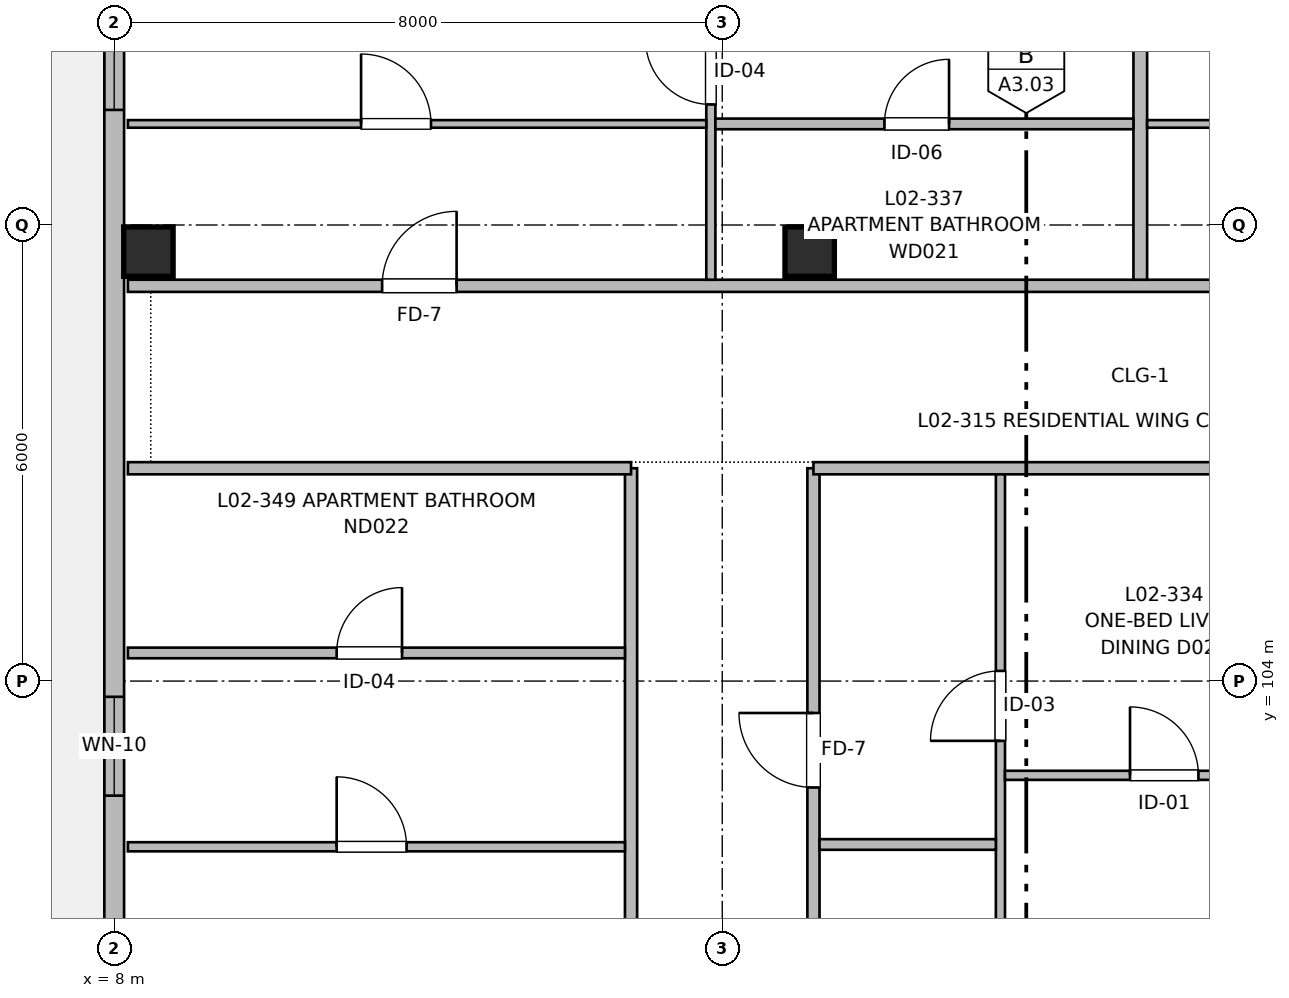
"""IFC4 building model, lengths in metres.
Left out: names, types, materials, properties, quantities, classifications, styles, units other than length and angle.
Written with IfcOpenShell. Run it as: python <this file> out.ifc"""

import sys

from ifc_helpers import new_model, si_unit, direction, frame, frame_2d, origin, origin_2d, place, context, subcontext, project, spatial, rectangle, extrude, element, fill, save


model = new_model("IFC4")
c1 = context("Model", 3, precision=1e-05, world=origin(), true_north=direction((0.0, 1.0)))
c2 = subcontext(c1, "Body", "Model", "MODEL_VIEW")
j1 = project(units=[si_unit("LENGTHUNIT", "METRE"), si_unit("PLANEANGLEUNIT", "RADIAN")], contexts=[c1])
p1 = place(None, origin())
s1 = spatial("IfcSite", under=j1, at=p1, CompositionType="ELEMENT")
p2 = place(p1, origin())
s2 = spatial("IfcBuilding", under=s1, at=p2, CompositionType="ELEMENT")
p3 = place(p2, frame((0.0, 0.0, 7.36)))
s3 = spatial("IfcBuildingStorey", under=s2, at=p3, CompositionType="ELEMENT", Elevation=7.36)
for number, where, z_axis, x_axis in (
    (1, (8.45, 109.65, 0.0), (0.0, 0.0, 1.0), (1.0, 0.0, 0.0)),
    (2, (17.15, 109.65, 0.0), (0.0, 0.0, 1.0), (1.0, 0.0, 0.0)),
):
    element("IfcColumn", number, at=place(p3, frame(where, z_axis=z_axis, x_axis=x_axis)), inside=s3, PredefinedType="COLUMN", context=c2, shape_type="SweptSolid", body=[
        extrude(rectangle(XDim=0.65, YDim=0.65, at=origin_2d()), origin(), (0.0, 0.0, 1.0), 3.2),
    ])
p4 = place(p3, frame((8.0, 56.0, 0.0), z_axis=(0.0, 0.0, 1.0), x_axis=(0.0, 1.0, 0.0)))
e3 = element("IfcWall", 3, at=p4, inside=s3, PredefinedType="SOLIDWALL", context=c2, shape_type="SweptSolid", body=[
    extrude(rectangle(XDim=60.0, YDim=0.26, at=frame_2d((30.0, 0.0))), origin(), (0.0, 0.0, 1.0), 2.98),
])
p5 = place(p4, frame((4.886, 0.0, 0.0)))
e4 = element("IfcOpeningElement", 4, at=p5, cuts=e3, PredefinedType="OPENING", context=c2, shape_type="SweptSolid", body=[
    extrude(rectangle(XDim=1.2, YDim=2.2, at=frame_2d((0.6, 1.1))), frame((0.0, 0.14, 0.0), z_axis=(0.0, -1.0, 0.0), x_axis=(1.0, 0.0, 0.0)), (0.0, 0.0, 1.0), 0.28),
])
p6 = place(p4, frame((12.107, 0.0, 0.82)))
e5 = element("IfcOpeningElement", 5, at=p6, cuts=e3, PredefinedType="OPENING", context=c2, shape_type="SweptSolid", body=[
    extrude(rectangle(XDim=1.5, YDim=1.4, at=frame_2d((0.75, 0.7))), frame((0.0, 0.14, 0.0), z_axis=(0.0, -1.0, 0.0), x_axis=(1.0, 0.0, 0.0)), (0.0, 0.0, 1.0), 0.28),
])
p7 = place(p4, frame((19.804, 0.0, 0.82)))
e6 = element("IfcOpeningElement", 6, at=p7, cuts=e3, PredefinedType="OPENING", context=c2, shape_type="SweptSolid", body=[
    extrude(rectangle(XDim=1.55, YDim=1.4, at=frame_2d((0.775, 0.7))), frame((0.0, 0.14, 0.0), z_axis=(0.0, -1.0, 0.0), x_axis=(1.0, 0.0, 0.0)), (0.0, 0.0, 1.0), 0.28),
])
p8 = place(p4, frame((29.3, 0.0, 0.87)))
e7 = element("IfcOpeningElement", 7, at=p8, cuts=e3, PredefinedType="OPENING", context=c2, shape_type="SweptSolid", body=[
    extrude(rectangle(XDim=1.4, YDim=1.35, at=frame_2d((0.7, 0.675))), frame((0.0, 0.14, 0.0), z_axis=(0.0, -1.0, 0.0), x_axis=(1.0, 0.0, 0.0)), (0.0, 0.0, 1.0), 0.28),
])
p9 = place(p4, frame((40.946, 0.0, 0.87)))
e8 = element("IfcOpeningElement", 8, at=p9, cuts=e3, PredefinedType="OPENING", context=c2, shape_type="SweptSolid", body=[
    extrude(rectangle(XDim=1.25, YDim=1.35, at=frame_2d((0.625, 0.675))), frame((0.0, 0.14, 0.0), z_axis=(0.0, -1.0, 0.0), x_axis=(1.0, 0.0, 0.0)), (0.0, 0.0, 1.0), 0.28),
])
p10 = place(p4, frame((46.493, 0.0, 0.82)))
e9 = element("IfcOpeningElement", 9, at=p10, cuts=e3, PredefinedType="OPENING", context=c2, shape_type="SweptSolid", body=[
    extrude(rectangle(XDim=1.3, YDim=1.4, at=frame_2d((0.65, 0.7))), frame((0.0, 0.14, 0.0), z_axis=(0.0, -1.0, 0.0), x_axis=(1.0, 0.0, 0.0)), (0.0, 0.0, 1.0), 0.28),
])
p11 = place(p4, frame((55.514, 0.0, 0.67)))
e10 = element("IfcOpeningElement", 10, at=p11, cuts=e3, PredefinedType="OPENING", context=c2, shape_type="SweptSolid", body=[
    extrude(rectangle(XDim=2.1, YDim=1.55, at=frame_2d((1.05, 0.775))), frame((0.0, 0.14, 0.0), z_axis=(0.0, -1.0, 0.0), x_axis=(1.0, 0.0, 0.0)), (0.0, 0.0, 1.0), 0.28),
])
p12 = place(p3, frame((14.8, 56.18, 0.0), z_axis=(0.0, 0.0, 1.0), x_axis=(0.0, 1.0, 0.0)))
e11 = element("IfcWall", 11, at=p12, inside=s3, PredefinedType="PARTITIONING", context=c2, shape_type="SweptSolid", body=[
    extrude(rectangle(XDim=50.62, YDim=0.16, at=frame_2d((25.31, 0.0))), origin(), (0.0, 0.0, 1.0), 2.935),
])
p13 = place(p12, frame((12.82, 0.0, 0.0)))
e12 = element("IfcOpeningElement", 12, at=p13, cuts=e11, PredefinedType="OPENING", context=c2, shape_type="SweptSolid", body=[
    extrude(rectangle(XDim=1.1, YDim=2.15, at=frame_2d((0.55, 1.075))), frame((0.0, 0.09, 0.0), z_axis=(0.0, -1.0, 0.0), x_axis=(1.0, 0.0, 0.0)), (0.0, 0.0, 1.0), 0.18),
])
p14 = place(p12, frame((19.22, 0.0, 0.0)))
e13 = element("IfcOpeningElement", 13, at=p14, cuts=e11, PredefinedType="OPENING", context=c2, shape_type="SweptSolid", body=[
    extrude(rectangle(XDim=1.6, YDim=2.15, at=frame_2d((0.8, 1.075))), frame((0.0, 0.09, 0.0), z_axis=(0.0, -1.0, 0.0), x_axis=(1.0, 0.0, 0.0)), (0.0, 0.0, 1.0), 0.18),
])
p15 = place(p12, frame((1.8, 0.0, 0.0)))
e14 = element("IfcOpeningElement", 14, at=p15, cuts=e11, PredefinedType="OPENING", context=c2, shape_type="SweptSolid", body=[
    extrude(rectangle(XDim=0.96, YDim=2.15, at=frame_2d((0.48, 1.075))), frame((0.0, 0.09, 0.0), z_axis=(0.0, -1.0, 0.0), x_axis=(1.0, 0.0, 0.0)), (0.0, 0.0, 1.0), 0.18),
])
p16 = place(p12, frame((32.625, 0.0, 0.0)))
e15 = element("IfcOpeningElement", 15, at=p16, cuts=e11, PredefinedType="OPENING", context=c2, shape_type="SweptSolid", body=[
    extrude(rectangle(XDim=0.98, YDim=2.15, at=frame_2d((0.49, 1.075))), frame((0.0, 0.09, 0.0), z_axis=(0.0, -1.0, 0.0), x_axis=(1.0, 0.0, 0.0)), (0.0, 0.0, 1.0), 0.18),
])
p17 = place(p12, frame((41.235, 0.0, 0.0)))
e16 = element("IfcOpeningElement", 16, at=p17, cuts=e11, PredefinedType="OPENING", context=c2, shape_type="SweptSolid", body=[
    extrude(rectangle(XDim=0.98, YDim=2.15, at=frame_2d((0.49, 1.075))), frame((0.0, 0.09, 0.0), z_axis=(0.0, -1.0, 0.0), x_axis=(1.0, 0.0, 0.0)), (0.0, 0.0, 1.0), 0.18),
])
p18 = place(p3, frame((17.2, 56.18, 0.0), z_axis=(0.0, 0.0, 1.0), x_axis=(0.0, 1.0, 0.0)))
e17 = element("IfcWall", 17, at=p18, inside=s3, PredefinedType="PARTITIONING", context=c2, shape_type="SweptSolid", body=[
    extrude(rectangle(XDim=50.62, YDim=0.16, at=frame_2d((25.31, 0.0))), origin(), (0.0, 0.0, 1.0), 2.935),
])
p19 = place(p18, frame((7.68, 0.0, 0.0)))
e18 = element("IfcOpeningElement", 18, at=p19, cuts=e17, PredefinedType="OPENING", context=c2, shape_type="SweptSolid", body=[
    extrude(rectangle(XDim=0.98, YDim=2.15, at=frame_2d((0.49, 1.075))), frame((0.0, 0.09, 0.0), z_axis=(0.0, -1.0, 0.0), x_axis=(1.0, 0.0, 0.0)), (0.0, 0.0, 1.0), 0.18),
])
p20 = place(p18, frame((22.43, 0.0, 0.0)))
e19 = element("IfcOpeningElement", 19, at=p20, cuts=e17, PredefinedType="OPENING", context=c2, shape_type="SweptSolid", body=[
    extrude(rectangle(XDim=0.98, YDim=2.15, at=frame_2d((0.49, 1.075))), frame((0.0, 0.09, 0.0), z_axis=(0.0, -1.0, 0.0), x_axis=(1.0, 0.0, 0.0)), (0.0, 0.0, 1.0), 0.18),
])
p21 = place(p18, frame((35.65, 0.0, 0.0)))
e20 = element("IfcOpeningElement", 20, at=p21, cuts=e17, PredefinedType="OPENING", context=c2, shape_type="SweptSolid", body=[
    extrude(rectangle(XDim=0.98, YDim=2.15, at=frame_2d((0.49, 1.075))), frame((0.0, 0.09, 0.0), z_axis=(0.0, -1.0, 0.0), x_axis=(1.0, 0.0, 0.0)), (0.0, 0.0, 1.0), 0.18),
])
p22 = place(p18, frame((46.42, 0.0, 0.0)))
e21 = element("IfcOpeningElement", 21, at=p22, cuts=e17, PredefinedType="OPENING", context=c2, shape_type="SweptSolid", body=[
    extrude(rectangle(XDim=0.98, YDim=2.15, at=frame_2d((0.49, 1.075))), frame((0.0, 0.09, 0.0), z_axis=(0.0, -1.0, 0.0), x_axis=(1.0, 0.0, 0.0)), (0.0, 0.0, 1.0), 0.18),
])
p23 = place(p3, frame((8.18, 106.8, 0.0), z_axis=(0.0, 0.0, 1.0), x_axis=(1.0, 0.0, 0.0)))
e22 = element("IfcWall", 22, at=p23, inside=s3, PredefinedType="PARTITIONING", context=c2, shape_type="SweptSolid", body=[
    extrude(rectangle(XDim=6.62, YDim=0.16, at=frame_2d((3.31, 0.0))), origin(), (0.0, 0.0, 1.0), 2.935),
])
p24 = place(p3, frame((17.2, 106.8, 0.0), z_axis=(0.0, 0.0, 1.0), x_axis=(1.0, 0.0, 0.0)))
e23 = element("IfcWall", 23, at=p24, inside=s3, PredefinedType="PARTITIONING", context=c2, shape_type="SweptSolid", body=[
    extrude(rectangle(XDim=17.62, YDim=0.16, at=frame_2d((8.81, 0.0))), origin(), (0.0, 0.0, 1.0), 2.935),
])
p25 = place(p24, frame((13.075, 0.0, 0.0)))
e24 = element("IfcOpeningElement", 24, at=p25, cuts=e23, PredefinedType="OPENING", context=c2, shape_type="SweptSolid", body=[
    extrude(rectangle(XDim=1.05, YDim=2.15, at=frame_2d((0.525, 1.075))), frame((0.0, 0.09, 0.0), z_axis=(0.0, -1.0, 0.0), x_axis=(1.0, 0.0, 0.0)), (0.0, 0.0, 1.0), 0.18),
])
p26 = place(p3, frame((8.18, 109.2, 0.0), z_axis=(0.0, 0.0, 1.0), x_axis=(1.0, 0.0, 0.0)))
e25 = element("IfcWall", 25, at=p26, inside=s3, PredefinedType="PARTITIONING", context=c2, shape_type="SweptSolid", body=[
    extrude(rectangle(XDim=26.64, YDim=0.16, at=frame_2d((13.32, 0.0))), origin(), (0.0, 0.0, 1.0), 2.935),
])
p27 = place(p26, frame((3.345, 0.0, 0.0)))
e26 = element("IfcOpeningElement", 26, at=p27, cuts=e25, PredefinedType="OPENING", context=c2, shape_type="SweptSolid", body=[
    extrude(rectangle(XDim=0.98, YDim=2.15, at=frame_2d((0.49, 1.075))), frame((0.0, 0.09, 0.0), z_axis=(0.0, -1.0, 0.0), x_axis=(1.0, 0.0, 0.0)), (0.0, 0.0, 1.0), 0.18),
])
p28 = place(p26, frame((15.955, 0.0, 0.0)))
e27 = element("IfcOpeningElement", 27, at=p28, cuts=e25, PredefinedType="OPENING", context=c2, shape_type="SweptSolid", body=[
    extrude(rectangle(XDim=0.98, YDim=2.15, at=frame_2d((0.49, 1.075))), frame((0.0, 0.09, 0.0), z_axis=(0.0, -1.0, 0.0), x_axis=(1.0, 0.0, 0.0)), (0.0, 0.0, 1.0), 0.18),
])
p29 = place(p3, frame((19.66, 97.71, 0.0), z_axis=(0.0, 0.0, 1.0), x_axis=(0.0, 1.0, 0.0)))
e28 = element("IfcWall", 28, at=p29, inside=s3, PredefinedType="PARTITIONING", context=c2, shape_type="SweptSolid", body=[
    extrude(rectangle(XDim=9.01, YDim=0.12, at=frame_2d((4.505, 0.0))), origin(), (0.0, 0.0, 1.0), 2.935),
])
p30 = place(p29, frame((1.573, 0.0, 0.0)))
e29 = element("IfcOpeningElement", 29, at=p30, cuts=e28, PredefinedType="OPENING", context=c2, shape_type="SweptSolid", body=[
    extrude(rectangle(XDim=0.86, YDim=2.1, at=frame_2d((0.43, 1.05))), frame((0.0, 0.07, 0.0), z_axis=(0.0, -1.0, 0.0), x_axis=(1.0, 0.0, 0.0)), (0.0, 0.0, 1.0), 0.14),
])
p31 = place(p29, frame((5.504, 0.0, 0.0)))
e30 = element("IfcOpeningElement", 30, at=p31, cuts=e28, PredefinedType="OPENING", context=c2, shape_type="SweptSolid", body=[
    extrude(rectangle(XDim=0.92, YDim=2.1, at=frame_2d((0.46, 1.05))), frame((0.0, 0.07, 0.0), z_axis=(0.0, -1.0, 0.0), x_axis=(1.0, 0.0, 0.0)), (0.0, 0.0, 1.0), 0.14),
])
p32 = place(p3, frame((17.28, 101.85, 0.0), z_axis=(0.0, 0.0, 1.0), x_axis=(1.0, 0.0, 0.0)))
e31 = element("IfcWall", 31, at=p32, inside=s3, PredefinedType="PARTITIONING", context=c2, shape_type="SweptSolid", body=[
    extrude(rectangle(XDim=2.32, YDim=0.14, at=frame_2d((1.16, 0.0))), origin(), (0.0, 0.0, 1.0), 2.935),
])
p33 = place(p3, frame((19.72, 102.76, 0.0), z_axis=(0.0, 0.0, 1.0), x_axis=(1.0, 0.0, 0.0)))
e32 = element("IfcWall", 32, at=p33, inside=s3, PredefinedType="PARTITIONING", context=c2, shape_type="SweptSolid", body=[
    extrude(rectangle(XDim=4.19, YDim=0.12, at=frame_2d((2.095, 0.0))), origin(), (0.0, 0.0, 1.0), 2.935),
])
p34 = place(p33, frame((1.645, 0.0, 0.0)))
e33 = element("IfcOpeningElement", 33, at=p34, cuts=e32, PredefinedType="OPENING", context=c2, shape_type="SweptSolid", body=[
    extrude(rectangle(XDim=0.9, YDim=2.1, at=frame_2d((0.45, 1.05))), frame((0.0, 0.07, 0.0), z_axis=(0.0, -1.0, 0.0), x_axis=(1.0, 0.0, 0.0)), (0.0, 0.0, 1.0), 0.14),
])
p35 = place(p3, frame((21.5, 109.28, 0.0), z_axis=(0.0, 0.0, 1.0), x_axis=(0.0, 1.0, 0.0)))
e34 = element("IfcWall", 34, at=p35, inside=s3, PredefinedType="PARTITIONING", context=c2, shape_type="SweptSolid", body=[
    extrude(rectangle(XDim=6.59, YDim=0.18, at=frame_2d((3.295, 0.0))), origin(), (0.0, 0.0, 1.0), 2.67),
])
p36 = place(p3, frame((15.85, 109.28, 0.0), z_axis=(0.0, 0.0, 1.0), x_axis=(0.0, 1.0, 0.0)))
e35 = element("IfcWall", 35, at=p36, inside=s3, PredefinedType="PARTITIONING", context=c2, shape_type="SweptSolid", body=[
    extrude(rectangle(XDim=6.59, YDim=0.12, at=frame_2d((3.295, 0.0))), origin(), (0.0, 0.0, 1.0), 2.935),
])
p37 = place(p36, frame((2.306, 0.0, 0.0)))
e36 = element("IfcOpeningElement", 36, at=p37, cuts=e35, PredefinedType="OPENING", context=c2, shape_type="SweptSolid", body=[
    extrude(rectangle(XDim=0.86, YDim=2.1, at=frame_2d((0.43, 1.05))), frame((0.0, 0.07, 0.0), z_axis=(0.0, -1.0, 0.0), x_axis=(1.0, 0.0, 0.0)), (0.0, 0.0, 1.0), 0.14),
])
p38 = place(p36, frame((4.093, 0.0, 0.0)))
e37 = element("IfcOpeningElement", 37, at=p38, cuts=e35, PredefinedType="OPENING", context=c2, shape_type="SweptSolid", body=[
    extrude(rectangle(XDim=0.9, YDim=2.1, at=frame_2d((0.45, 1.05))), frame((0.0, 0.07, 0.0), z_axis=(0.0, -1.0, 0.0), x_axis=(1.0, 0.0, 0.0)), (0.0, 0.0, 1.0), 0.14),
])
p39 = place(p3, frame((15.91, 111.33, 0.0), z_axis=(0.0, 0.0, 1.0), x_axis=(1.0, 0.0, 0.0)))
e38 = element("IfcWall", 38, at=p39, inside=s3, PredefinedType="PARTITIONING", context=c2, shape_type="SweptSolid", body=[
    extrude(rectangle(XDim=5.5, YDim=0.14, at=frame_2d((2.75, 0.0))), origin(), (0.0, 0.0, 1.0), 2.935),
])
p40 = place(p39, frame((2.224, 0.0, 0.0)))
e39 = element("IfcOpeningElement", 39, at=p40, cuts=e38, PredefinedType="OPENING", context=c2, shape_type="SweptSolid", body=[
    extrude(rectangle(XDim=0.85, YDim=2.05, at=frame_2d((0.425, 1.025))), frame((0.0, 0.08, 0.0), z_axis=(0.0, -1.0, 0.0), x_axis=(1.0, 0.0, 0.0)), (0.0, 0.0, 1.0), 0.16),
])
p41 = place(p3, frame((8.18, 111.33, 0.0), z_axis=(0.0, 0.0, 1.0), x_axis=(1.0, 0.0, 0.0)))
e40 = element("IfcWall", 40, at=p41, inside=s3, PredefinedType="PARTITIONING", context=c2, shape_type="SweptSolid", body=[
    extrude(rectangle(XDim=7.61, YDim=0.1, at=frame_2d((3.805, 0.0))), origin(), (0.0, 0.0, 1.0), 2.935),
])
p42 = place(p41, frame((3.068, 0.0, 0.0)))
e41 = element("IfcOpeningElement", 41, at=p42, cuts=e40, PredefinedType="OPENING", context=c2, shape_type="SweptSolid", body=[
    extrude(rectangle(XDim=0.92, YDim=2.1, at=frame_2d((0.46, 1.05))), frame((0.0, 0.06, 0.0), z_axis=(0.0, -1.0, 0.0), x_axis=(1.0, 0.0, 0.0)), (0.0, 0.0, 1.0), 0.12),
])
p43 = place(p3, frame((21.59, 111.33, 0.0), z_axis=(0.0, 0.0, 1.0), x_axis=(1.0, 0.0, 0.0)))
e42 = element("IfcWall", 42, at=p43, inside=s3, PredefinedType="PARTITIONING", context=c2, shape_type="SweptSolid", body=[
    extrude(rectangle(XDim=7.61, YDim=0.1, at=frame_2d((3.805, 0.0))), origin(), (0.0, 0.0, 1.0), 2.935),
])
p44 = place(p43, frame((3.068, 0.0, 0.0)))
e43 = element("IfcOpeningElement", 43, at=p44, cuts=e42, PredefinedType="OPENING", context=c2, shape_type="SweptSolid", body=[
    extrude(rectangle(XDim=0.92, YDim=2.1, at=frame_2d((0.46, 1.05))), frame((0.0, 0.06, 0.0), z_axis=(0.0, -1.0, 0.0), x_axis=(1.0, 0.0, 0.0)), (0.0, 0.0, 1.0), 0.12),
])
p45 = place(p3, frame((8.18, 101.82, 0.0), z_axis=(0.0, 0.0, 1.0), x_axis=(1.0, 0.0, 0.0)))
e44 = element("IfcWall", 44, at=p45, inside=s3, PredefinedType="PARTITIONING", context=c2, shape_type="SweptSolid", body=[
    extrude(rectangle(XDim=6.54, YDim=0.12, at=frame_2d((3.27, 0.0))), origin(), (0.0, 0.0, 1.0), 2.935),
])
p46 = place(p45, frame((2.747, 0.0, 0.0)))
e45 = element("IfcOpeningElement", 45, at=p46, cuts=e44, PredefinedType="OPENING", context=c2, shape_type="SweptSolid", body=[
    extrude(rectangle(XDim=0.92, YDim=2.1, at=frame_2d((0.46, 1.05))), frame((0.0, 0.07, 0.0), z_axis=(0.0, -1.0, 0.0), x_axis=(1.0, 0.0, 0.0)), (0.0, 0.0, 1.0), 0.14),
])
p47 = place(p3, frame((8.18, 104.37, 0.0), z_axis=(0.0, 0.0, 1.0), x_axis=(1.0, 0.0, 0.0)))
e46 = element("IfcWall", 46, at=p47, inside=s3, PredefinedType="PARTITIONING", context=c2, shape_type="SweptSolid", body=[
    extrude(rectangle(XDim=6.54, YDim=0.14, at=frame_2d((3.27, 0.0))), origin(), (0.0, 0.0, 1.0), 2.935),
])
p48 = place(p47, frame((2.747, 0.0, 0.0)))
e47 = element("IfcOpeningElement", 47, at=p48, cuts=e46, PredefinedType="OPENING", context=c2, shape_type="SweptSolid", body=[
    extrude(rectangle(XDim=0.86, YDim=2.1, at=frame_2d((0.43, 1.05))), frame((0.0, 0.08, 0.0), z_axis=(0.0, -1.0, 0.0), x_axis=(1.0, 0.0, 0.0)), (0.0, 0.0, 1.0), 0.16),
])
p49 = place(p10, origin())
e48 = element("IfcWindow", 48, at=p49, inside=s3, PartitioningType="SINGLE_PANEL", PredefinedType="WINDOW", context=c2, shape_type="SweptSolid", body=[
    extrude(rectangle(XDim=1.3, YDim=1.4, at=frame_2d((0.65, 0.7))), frame((0.0, 0.03, 0.0), z_axis=(0.0, -1.0, 0.0), x_axis=(1.0, 0.0, 0.0)), (0.0, 0.0, 1.0), 0.06),
])
fill(e9, e48)
p50 = place(p11, origin())
e49 = element("IfcWindow", 49, at=p50, inside=s3, PartitioningType="SINGLE_PANEL", PredefinedType="WINDOW", context=c2, shape_type="SweptSolid", body=[
    extrude(rectangle(XDim=2.1, YDim=1.55, at=frame_2d((1.05, 0.775))), frame((0.0, 0.03, 0.0), z_axis=(0.0, -1.0, 0.0), x_axis=(1.0, 0.0, 0.0)), (0.0, 0.0, 1.0), 0.06),
])
fill(e10, e49)
p51 = place(p31, origin())
e50 = element("IfcDoor", 50, at=p51, inside=s3, OperationType="SINGLE_SWING_LEFT", PredefinedType="DOOR", context=c2, shape_type="SweptSolid", body=[
    extrude(rectangle(XDim=0.92, YDim=2.1, at=frame_2d((0.46, 1.05))), frame((0.0, 0.025, 0.0), z_axis=(0.0, -1.0, 0.0), x_axis=(1.0, 0.0, 0.0)), (0.0, 0.0, 1.0), 0.05),
])
fill(e30, e50)
p52 = place(p22, origin())
e51 = element("IfcDoor", 51, at=p52, inside=s3, OperationType="SINGLE_SWING_RIGHT", PredefinedType="DOOR", context=c2, shape_type="SweptSolid", body=[
    extrude(rectangle(XDim=0.98, YDim=2.15, at=frame_2d((0.49, 1.075))), frame((0.0, 0.025, 0.0), z_axis=(0.0, -1.0, 0.0), x_axis=(1.0, 0.0, 0.0)), (0.0, 0.0, 1.0), 0.05),
])
fill(e21, e51)
p53 = place(p34, origin())
e52 = element("IfcDoor", 52, at=p53, inside=s3, OperationType="SINGLE_SWING_LEFT", PredefinedType="DOOR", context=c2, shape_type="SweptSolid", body=[
    extrude(rectangle(XDim=0.9, YDim=2.1, at=frame_2d((0.45, 1.05))), frame((0.0, 0.025, 0.0), z_axis=(0.0, -1.0, 0.0), x_axis=(1.0, 0.0, 0.0)), (0.0, 0.0, 1.0), 0.05),
])
fill(e33, e52)
p54 = place(p27, origin())
e53 = element("IfcDoor", 53, at=p54, inside=s3, OperationType="SINGLE_SWING_RIGHT", PredefinedType="DOOR", context=c2, shape_type="SweptSolid", body=[
    extrude(rectangle(XDim=0.98, YDim=2.15, at=frame_2d((0.49, 1.075))), frame((0.0, 0.025, 0.0), z_axis=(0.0, -1.0, 0.0), x_axis=(1.0, 0.0, 0.0)), (0.0, 0.0, 1.0), 0.05),
])
fill(e26, e53)
p55 = place(p42, origin())
e54 = element("IfcDoor", 54, at=p55, inside=s3, OperationType="SINGLE_SWING_LEFT", PredefinedType="DOOR", context=c2, shape_type="SweptSolid", body=[
    extrude(rectangle(XDim=0.92, YDim=2.1, at=frame_2d((0.46, 1.05))), frame((0.0, 0.025, 0.0), z_axis=(0.0, -1.0, 0.0), x_axis=(1.0, 0.0, 0.0)), (0.0, 0.0, 1.0), 0.05),
])
fill(e41, e54)
p56 = place(p37, origin())
e55 = element("IfcDoor", 55, at=p56, inside=s3, OperationType="SINGLE_SWING_RIGHT", PredefinedType="DOOR", context=c2, shape_type="SweptSolid", body=[
    extrude(rectangle(XDim=0.86, YDim=2.1, at=frame_2d((0.43, 1.05))), frame((0.0, 0.025, 0.0), z_axis=(0.0, -1.0, 0.0), x_axis=(1.0, 0.0, 0.0)), (0.0, 0.0, 1.0), 0.05),
])
fill(e36, e55)
p57 = place(p40, origin())
e56 = element("IfcDoor", 56, at=p57, inside=s3, OperationType="SINGLE_SWING_RIGHT", PredefinedType="DOOR", context=c2, shape_type="SweptSolid", body=[
    extrude(rectangle(XDim=0.85, YDim=2.05, at=frame_2d((0.425, 1.025))), frame((0.0, 0.025, 0.0), z_axis=(0.0, -1.0, 0.0), x_axis=(1.0, 0.0, 0.0)), (0.0, 0.0, 1.0), 0.05),
])
fill(e39, e56)
p58 = place(p48, origin())
e57 = element("IfcDoor", 57, at=p58, inside=s3, OperationType="SINGLE_SWING_RIGHT", PredefinedType="DOOR", context=c2, shape_type="SweptSolid", body=[
    extrude(rectangle(XDim=0.86, YDim=2.1, at=frame_2d((0.43, 1.05))), frame((0.0, 0.025, 0.0), z_axis=(0.0, -1.0, 0.0), x_axis=(1.0, 0.0, 0.0)), (0.0, 0.0, 1.0), 0.05),
])
fill(e47, e57)
p59 = place(p46, origin())
e58 = element("IfcDoor", 58, at=p59, inside=s3, OperationType="SINGLE_SWING_LEFT", PredefinedType="DOOR", context=c2, shape_type="SweptSolid", body=[
    extrude(rectangle(XDim=0.92, YDim=2.1, at=frame_2d((0.46, 1.05))), frame((0.0, 0.025, 0.0), z_axis=(0.0, -1.0, 0.0), x_axis=(1.0, 0.0, 0.0)), (0.0, 0.0, 1.0), 0.05),
])
fill(e45, e58)
save(model, sys.argv[1])
